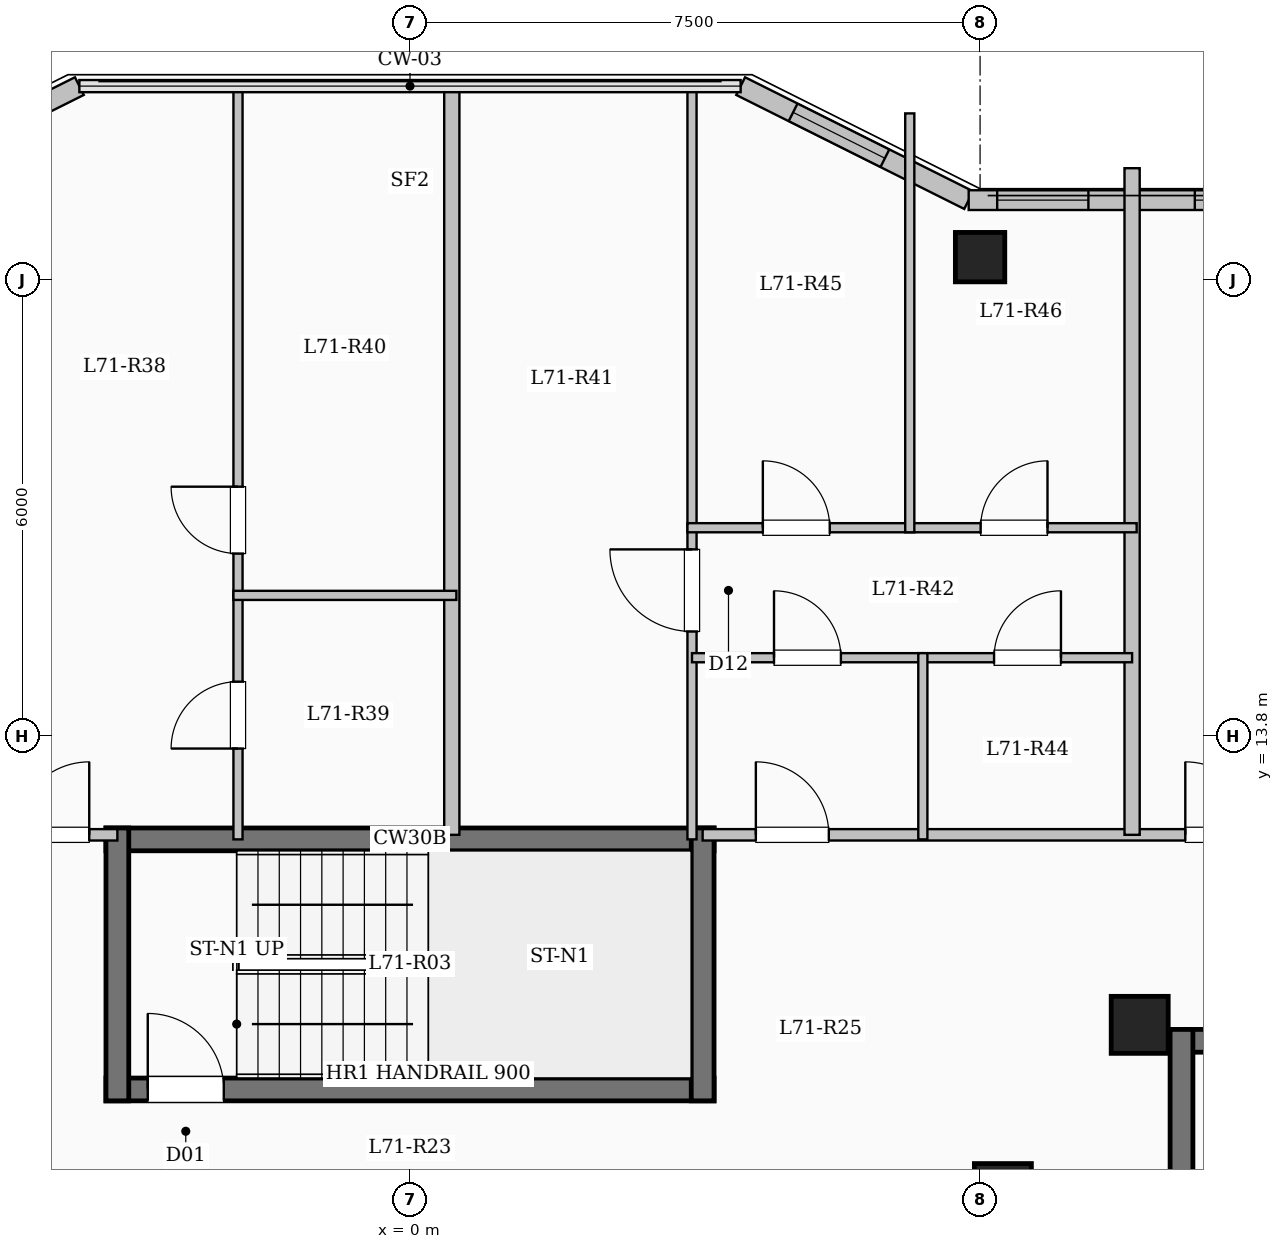
"""IFC4 building model, lengths in metres.
Left out: names, types, materials, properties, quantities, classifications, styles, units other than length and angle.
Written with IfcOpenShell. Run it as: python <this file> out.ifc"""

import sys

from ifc_helpers import new_model, si_unit, direction, frame, frame_2d, origin, origin_2d, place, context, subcontext, project, spatial, rectangle, extrude, element, fill, save


model = new_model("IFC4")
c1 = context("Model", 3, precision=1e-05, world=origin(), true_north=direction((0.0, 1.0)))
c2 = subcontext(c1, "Body", "Model", "MODEL_VIEW")
j1 = project(units=[si_unit("LENGTHUNIT", "METRE"), si_unit("PLANEANGLEUNIT", "RADIAN")], contexts=[c1])
p1 = place(None, origin())
s1 = spatial("IfcSite", under=j1, at=p1, CompositionType="ELEMENT")
p2 = place(p1, origin())
s2 = spatial("IfcBuilding", under=s1, at=p2, CompositionType="ELEMENT")
p3 = place(p2, frame((0.0, 0.0, 261.6)))
s3 = spatial("IfcBuildingStorey", under=s2, at=p3, CompositionType="ELEMENT", Elevation=261.6)
for number, where, z_axis, x_axis in (
    (1, (7.8, 7.8, 0.0), (0.0, 0.0, 1.0), (1.0, 0.0, 0.0)),
    (2, (9.6, 10.0, 0.0), (0.0, 0.0, 1.0), (1.0, 0.0, 0.0)),
):
    element("IfcColumn", number, at=place(p3, frame(where, z_axis=z_axis, x_axis=x_axis)), inside=s3, PredefinedType="COLUMN", context=c2, shape_type="SweptSolid", body=[
        extrude(rectangle(XDim=0.75, YDim=0.75, at=origin_2d()), origin(), (0.0, 0.0, 1.0), 3.35),
    ])
p4 = place(p3, frame((7.5, 20.1, 0.0), z_axis=(0.0, 0.0, 1.0), x_axis=(1.0, 0.0, 0.0)))
e3 = element("IfcColumn", 3, at=p4, inside=s3, PredefinedType="COLUMN", context=c2, shape_type="SweptSolid", body=[
    extrude(rectangle(XDim=0.65, YDim=0.65, at=origin_2d()), origin(), (0.0, 0.0, 1.0), 3.35),
])
p5 = place(p3, frame((-7.35, 20.85, 0.0), z_axis=(0.0, 0.0, 1.0), x_axis=(0.894427191, 0.4472135955, 0.0)))
e4 = element("IfcWall", 4, at=p5, inside=s3, PredefinedType="SOLIDWALL", context=c2, shape_type="SweptSolid", body=[
    extrude(rectangle(XDim=3.354, YDim=0.26, at=frame_2d((1.677, 0.0))), origin(), (0.0, 0.0, 1.0), 3.1),
])
p6 = place(p5, frame((0.401, 0.0, 0.95)))
e5 = element("IfcOpeningElement", 5, at=p6, cuts=e4, PredefinedType="OPENING", context=c2, shape_type="SweptSolid", body=[
    extrude(rectangle(XDim=1.0, YDim=1.5, at=frame_2d((0.5, 0.75))), frame((0.0, 0.14, 0.0), z_axis=(0.0, -1.0, 0.0), x_axis=(1.0, 0.0, 0.0)), (0.0, 0.0, 1.0), 0.28),
])
p7 = place(p3, frame((4.35, 22.35, 0.0), z_axis=(0.0, 0.0, 1.0), x_axis=(0.894427191, -0.4472135955, 0.0)))
e6 = element("IfcWall", 6, at=p7, inside=s3, PredefinedType="SOLIDWALL", context=c2, shape_type="SweptSolid", body=[
    extrude(rectangle(XDim=3.354, YDim=0.26, at=frame_2d((1.677, 0.0))), origin(), (0.0, 0.0, 1.0), 3.1),
])
p8 = place(p7, frame((0.772, 0.0, 0.95)))
e7 = element("IfcOpeningElement", 7, at=p8, cuts=e6, PredefinedType="OPENING", context=c2, shape_type="SweptSolid", body=[
    extrude(rectangle(XDim=1.35, YDim=1.55, at=frame_2d((0.675, 0.775))), frame((0.0, 0.14, 0.0), z_axis=(0.0, -1.0, 0.0), x_axis=(1.0, 0.0, 0.0)), (0.0, 0.0, 1.0), 0.28),
])
p9 = place(p3, frame((7.35, 20.85, 0.0), z_axis=(0.0, 0.0, 1.0), x_axis=(1.0, 0.0, 0.0)))
e8 = element("IfcWall", 8, at=p9, inside=s3, PredefinedType="SOLIDWALL", context=c2, shape_type="SweptSolid", body=[
    extrude(rectangle(XDim=10.5, YDim=0.26, at=frame_2d((5.25, 0.0))), origin(), (0.0, 0.0, 1.0), 3.1),
])
p10 = place(p9, frame((0.375, 0.0, 0.95)))
e9 = element("IfcOpeningElement", 9, at=p10, cuts=e8, PredefinedType="OPENING", context=c2, shape_type="SweptSolid", body=[
    extrude(rectangle(XDim=1.2, YDim=1.5, at=frame_2d((0.6, 0.75))), frame((0.0, 0.14, 0.0), z_axis=(0.0, -1.0, 0.0), x_axis=(1.0, 0.0, 0.0)), (0.0, 0.0, 1.0), 0.28),
])
p11 = place(p9, frame((2.975, 0.0, 0.9)))
e10 = element("IfcOpeningElement", 10, at=p11, cuts=e8, PredefinedType="OPENING", context=c2, shape_type="SweptSolid", body=[
    extrude(rectangle(XDim=1.65, YDim=1.6, at=frame_2d((0.825, 0.8))), frame((0.0, 0.14, 0.0), z_axis=(0.0, -1.0, 0.0), x_axis=(1.0, 0.0, 0.0)), (0.0, 0.0, 1.0), 0.28),
])
p12 = place(p9, frame((6.1, 0.0, 0.95)))
e11 = element("IfcOpeningElement", 11, at=p12, cuts=e8, PredefinedType="OPENING", context=c2, shape_type="SweptSolid", body=[
    extrude(rectangle(XDim=1.2, YDim=1.5, at=frame_2d((0.6, 0.75))), frame((0.0, 0.14, 0.0), z_axis=(0.0, -1.0, 0.0), x_axis=(1.0, 0.0, 0.0)), (0.0, 0.0, 1.0), 0.28),
])
p13 = place(p9, frame((8.575, 0.0, 0.95)))
e12 = element("IfcOpeningElement", 12, at=p13, cuts=e8, PredefinedType="OPENING", context=c2, shape_type="SweptSolid", body=[
    extrude(rectangle(XDim=1.2, YDim=1.5, at=frame_2d((0.6, 0.75))), frame((0.0, 0.14, 0.0), z_axis=(0.0, -1.0, 0.0), x_axis=(1.0, 0.0, 0.0)), (0.0, 0.0, 1.0), 0.28),
])
p14 = place(p3, frame((10.0, 9.79, 0.0), z_axis=(0.0, 0.0, 1.0), x_axis=(1.0, 0.0, 0.0)))
e13 = element("IfcWall", 13, at=p14, inside=s3, PredefinedType="SHEAR", context=c2, shape_type="SweptSolid", body=[
    extrude(rectangle(XDim=8.0, YDim=0.3, at=frame_2d((4.0, 0.0))), origin(), (0.0, 0.0, 1.0), 3.35),
])
p15 = place(p3, frame((10.15, 6.35, 0.0), z_axis=(0.0, 0.0, 1.0), x_axis=(0.0, 1.0, 0.0)))
e14 = element("IfcWall", 14, at=p15, inside=s3, PredefinedType="SHEAR", context=c2, shape_type="SweptSolid", body=[
    extrude(rectangle(XDim=3.59, YDim=0.3, at=frame_2d((1.795, 0.0))), origin(), (0.0, 0.0, 1.0), 3.35),
])
p16 = place(p3, frame((-4.0, 12.44, 0.0), z_axis=(0.0, 0.0, 1.0), x_axis=(1.0, 0.0, 0.0)))
e15 = element("IfcWall", 15, at=p16, inside=s3, PredefinedType="SHEAR", context=c2, shape_type="SweptSolid", body=[
    extrude(rectangle(XDim=8.0, YDim=0.3, at=frame_2d((4.0, 0.0))), origin(), (0.0, 0.0, 1.0), 3.35),
])
p17 = place(p3, frame((-4.0, 9.15, 0.0), z_axis=(0.0, 0.0, 1.0), x_axis=(1.0, 0.0, 0.0)))
e16 = element("IfcWall", 16, at=p17, inside=s3, PredefinedType="SHEAR", context=c2, shape_type="SweptSolid", body=[
    extrude(rectangle(XDim=8.0, YDim=0.3, at=frame_2d((4.0, 0.0))), origin(), (0.0, 0.0, 1.0), 3.35),
])
p18 = place(p17, frame((0.55, 0.0, 0.0)))
e17 = element("IfcOpeningElement", 17, at=p18, cuts=e16, PredefinedType="OPENING", context=c2, shape_type="SweptSolid", body=[
    extrude(rectangle(XDim=1.0, YDim=2.15, at=frame_2d((0.5, 1.075))), frame((0.0, 0.16, 0.0), z_axis=(0.0, -1.0, 0.0), x_axis=(1.0, 0.0, 0.0)), (0.0, 0.0, 1.0), 0.32),
])
for number, where, z_axis, x_axis in (
    (18, (-3.85, 9.0, 0.0), (0.0, 0.0, 1.0), (0.0, 1.0, 0.0)),
    (19, (3.85, 9.0, 0.0), (0.0, 0.0, 1.0), (0.0, 1.0, 0.0)),
):
    element("IfcWall", number, at=place(p3, frame(where, z_axis=z_axis, x_axis=x_axis)), inside=s3, PredefinedType="SHEAR", context=c2, shape_type="SweptSolid", body=[
        extrude(rectangle(XDim=3.59, YDim=0.3, at=frame_2d((1.795, 0.0))), origin(), (0.0, 0.0, 1.0), 3.35),
    ])
p19 = place(p3, frame((-17.75, 12.5, 0.0), z_axis=(0.0, 0.0, 1.0), x_axis=(1.0, 0.0, 0.0)))
e20 = element("IfcWall", 20, at=p19, inside=s3, PredefinedType="PARTITIONING", context=c2, shape_type="SweptSolid", body=[
    extrude(rectangle(XDim=13.9, YDim=0.15, at=frame_2d((6.95, 0.0))), origin(), (0.0, 0.0, 1.0), 3.1),
])
p20 = place(p19, frame((0.7, 0.0, 0.0)))
e21 = element("IfcOpeningElement", 21, at=p20, cuts=e20, PredefinedType="OPENING", context=c2, shape_type="SweptSolid", body=[
    extrude(rectangle(XDim=0.96, YDim=2.15, at=frame_2d((0.48, 1.075))), frame((0.0, 0.085, 0.0), z_axis=(0.0, -1.0, 0.0), x_axis=(1.0, 0.0, 0.0)), (0.0, 0.0, 1.0), 0.17),
])
p21 = place(p19, frame((7.105, 0.0, 0.0)))
e22 = element("IfcOpeningElement", 22, at=p21, cuts=e20, PredefinedType="OPENING", context=c2, shape_type="SweptSolid", body=[
    extrude(rectangle(XDim=0.96, YDim=2.15, at=frame_2d((0.48, 1.075))), frame((0.0, 0.085, 0.0), z_axis=(0.0, -1.0, 0.0), x_axis=(1.0, 0.0, 0.0)), (0.0, 0.0, 1.0), 0.17),
])
p22 = place(p19, frame((12.57, 0.0, 0.0)))
e23 = element("IfcOpeningElement", 23, at=p22, cuts=e20, PredefinedType="OPENING", context=c2, shape_type="SweptSolid", body=[
    extrude(rectangle(XDim=0.96, YDim=2.15, at=frame_2d((0.48, 1.075))), frame((0.0, 0.085, 0.0), z_axis=(0.0, -1.0, 0.0), x_axis=(1.0, 0.0, 0.0)), (0.0, 0.0, 1.0), 0.17),
])
p23 = place(p3, frame((3.85, 12.5, 0.0), z_axis=(0.0, 0.0, 1.0), x_axis=(1.0, 0.0, 0.0)))
e24 = element("IfcWall", 24, at=p23, inside=s3, PredefinedType="PARTITIONING", context=c2, shape_type="SweptSolid", body=[
    extrude(rectangle(XDim=13.9, YDim=0.15, at=frame_2d((6.95, 0.0))), origin(), (0.0, 0.0, 1.0), 3.1),
])
p24 = place(p23, frame((0.7, 0.0, 0.0)))
e25 = element("IfcOpeningElement", 25, at=p24, cuts=e24, PredefinedType="OPENING", context=c2, shape_type="SweptSolid", body=[
    extrude(rectangle(XDim=0.96, YDim=2.15, at=frame_2d((0.48, 1.075))), frame((0.0, 0.085, 0.0), z_axis=(0.0, -1.0, 0.0), x_axis=(1.0, 0.0, 0.0)), (0.0, 0.0, 1.0), 0.17),
])
p25 = place(p23, frame((6.35, 0.0, 0.0)))
e26 = element("IfcOpeningElement", 26, at=p25, cuts=e24, PredefinedType="OPENING", context=c2, shape_type="SweptSolid", body=[
    extrude(rectangle(XDim=0.96, YDim=2.15, at=frame_2d((0.48, 1.075))), frame((0.0, 0.085, 0.0), z_axis=(0.0, -1.0, 0.0), x_axis=(1.0, 0.0, 0.0)), (0.0, 0.0, 1.0), 0.17),
])
p26 = place(p3, frame((0.55, 12.5, 0.0), z_axis=(0.0, 0.0, 1.0), x_axis=(0.0, 1.0, 0.0)))
e27 = element("IfcWall", 27, at=p26, inside=s3, PredefinedType="SOLIDWALL", context=c2, shape_type="SweptSolid", body=[
    extrude(rectangle(XDim=9.88, YDim=0.2, at=frame_2d((4.94, 0.0))), origin(), (0.0, 0.0, 1.0), 3.1),
])
p27 = place(p3, frame((-2.263, 12.44, 0.0), z_axis=(0.0, 0.0, 1.0), x_axis=(0.0, 1.0, 0.0)))
e28 = element("IfcWall", 28, at=p27, inside=s3, PredefinedType="PARTITIONING", context=c2, shape_type="SweptSolid", body=[
    extrude(rectangle(XDim=3.21, YDim=0.12, at=frame_2d((1.605, 0.0))), origin(), (0.0, 0.0, 1.0), 3.1),
])
p28 = place(p27, frame((1.195, 0.0, 0.0)))
e29 = element("IfcOpeningElement", 29, at=p28, cuts=e28, PredefinedType="OPENING", context=c2, shape_type="SweptSolid", body=[
    extrude(rectangle(XDim=0.88, YDim=2.1, at=frame_2d((0.44, 1.05))), frame((0.0, 0.07, 0.0), z_axis=(0.0, -1.0, 0.0), x_axis=(1.0, 0.0, 0.0)), (0.0, 0.0, 1.0), 0.14),
])
p29 = place(p3, frame((-2.263, 15.65, 0.0), z_axis=(0.0, 0.0, 1.0), x_axis=(0.0, 1.0, 0.0)))
e30 = element("IfcWall", 30, at=p29, inside=s3, PredefinedType="PARTITIONING", context=c2, shape_type="SweptSolid", body=[
    extrude(rectangle(XDim=6.73, YDim=0.12, at=frame_2d((3.365, 0.0))), origin(), (0.0, 0.0, 1.0), 3.1),
])
p30 = place(p29, frame((0.55, 0.0, 0.0)))
e31 = element("IfcOpeningElement", 31, at=p30, cuts=e30, PredefinedType="OPENING", context=c2, shape_type="SweptSolid", body=[
    extrude(rectangle(XDim=0.88, YDim=2.1, at=frame_2d((0.44, 1.05))), frame((0.0, 0.07, 0.0), z_axis=(0.0, -1.0, 0.0), x_axis=(1.0, 0.0, 0.0)), (0.0, 0.0, 1.0), 0.14),
])
p31 = place(p3, frame((-2.323, 15.65, 0.0), z_axis=(0.0, 0.0, 1.0), x_axis=(1.0, 0.0, 0.0)))
e32 = element("IfcWall", 32, at=p31, inside=s3, PredefinedType="PARTITIONING", context=c2, shape_type="SweptSolid", body=[
    extrude(rectangle(XDim=2.933, YDim=0.12, at=frame_2d((1.467, 0.0))), origin(), (0.0, 0.0, 1.0), 2.785),
])
p32 = place(p3, frame((9.5, 12.5, 0.0), z_axis=(0.0, 0.0, 1.0), x_axis=(0.0, 1.0, 0.0)))
e33 = element("IfcWall", 33, at=p32, inside=s3, PredefinedType="SOLIDWALL", context=c2, shape_type="SweptSolid", body=[
    extrude(rectangle(XDim=8.77, YDim=0.2, at=frame_2d((4.385, 0.0))), origin(), (0.0, 0.0, 1.0), 3.1),
])
p33 = place(p3, frame((3.71, 12.44, 0.0), z_axis=(0.0, 0.0, 1.0), x_axis=(0.0, 1.0, 0.0)))
e34 = element("IfcWall", 34, at=p33, inside=s3, PredefinedType="PARTITIONING", context=c2, shape_type="SweptSolid", body=[
    extrude(rectangle(XDim=9.94, YDim=0.12, at=frame_2d((4.97, 0.0))), origin(), (0.0, 0.0, 1.0), 3.1),
])
p34 = place(p33, frame((2.735, 0.0, 0.0)))
e35 = element("IfcOpeningElement", 35, at=p34, cuts=e34, PredefinedType="OPENING", context=c2, shape_type="SweptSolid", body=[
    extrude(rectangle(XDim=1.08, YDim=2.15, at=frame_2d((0.54, 1.075))), frame((0.0, 0.07, 0.0), z_axis=(0.0, -1.0, 0.0), x_axis=(1.0, 0.0, 0.0)), (0.0, 0.0, 1.0), 0.14),
])
p35 = place(p3, frame((3.71, 14.83, 0.0), z_axis=(0.0, 0.0, 1.0), x_axis=(1.0, 0.0, 0.0)))
e36 = element("IfcWall", 36, at=p35, inside=s3, PredefinedType="PARTITIONING", context=c2, shape_type="SweptSolid", body=[
    extrude(rectangle(XDim=3.037, YDim=0.12, at=frame_2d((1.519, 0.0))), origin(), (0.0, 0.0, 1.0), 3.1),
])
p36 = place(p35, frame((1.079, 0.0, 0.0)))
e37 = element("IfcOpeningElement", 37, at=p36, cuts=e36, PredefinedType="OPENING", context=c2, shape_type="SweptSolid", body=[
    extrude(rectangle(XDim=0.88, YDim=2.1, at=frame_2d((0.44, 1.05))), frame((0.0, 0.07, 0.0), z_axis=(0.0, -1.0, 0.0), x_axis=(1.0, 0.0, 0.0)), (0.0, 0.0, 1.0), 0.14),
])
p37 = place(p3, frame((6.747, 14.83, 0.0), z_axis=(0.0, 0.0, 1.0), x_axis=(1.0, 0.0, 0.0)))
e38 = element("IfcWall", 38, at=p37, inside=s3, PredefinedType="PARTITIONING", context=c2, shape_type="SweptSolid", body=[
    extrude(rectangle(XDim=2.753, YDim=0.12, at=frame_2d((1.376, 0.0))), origin(), (0.0, 0.0, 1.0), 3.1),
])
p38 = place(p37, frame((0.937, 0.0, 0.0)))
e39 = element("IfcOpeningElement", 39, at=p38, cuts=e38, PredefinedType="OPENING", context=c2, shape_type="SweptSolid", body=[
    extrude(rectangle(XDim=0.88, YDim=2.1, at=frame_2d((0.44, 1.05))), frame((0.0, 0.07, 0.0), z_axis=(0.0, -1.0, 0.0), x_axis=(1.0, 0.0, 0.0)), (0.0, 0.0, 1.0), 0.14),
])
p39 = place(p3, frame((3.65, 16.54, 0.0), z_axis=(0.0, 0.0, 1.0), x_axis=(1.0, 0.0, 0.0)))
e40 = element("IfcWall", 40, at=p39, inside=s3, PredefinedType="PARTITIONING", context=c2, shape_type="SweptSolid", body=[
    extrude(rectangle(XDim=5.91, YDim=0.12, at=frame_2d((2.955, 0.0))), origin(), (0.0, 0.0, 1.0), 3.1),
])
p40 = place(p39, frame((0.992, 0.0, 0.0)))
e41 = element("IfcOpeningElement", 41, at=p40, cuts=e40, PredefinedType="OPENING", context=c2, shape_type="SweptSolid", body=[
    extrude(rectangle(XDim=0.88, YDim=2.1, at=frame_2d((0.44, 1.05))), frame((0.0, 0.07, 0.0), z_axis=(0.0, -1.0, 0.0), x_axis=(1.0, 0.0, 0.0)), (0.0, 0.0, 1.0), 0.14),
])
p41 = place(p39, frame((3.857, 0.0, 0.0)))
e42 = element("IfcOpeningElement", 42, at=p41, cuts=e40, PredefinedType="OPENING", context=c2, shape_type="SweptSolid", body=[
    extrude(rectangle(XDim=0.88, YDim=2.1, at=frame_2d((0.44, 1.05))), frame((0.0, 0.07, 0.0), z_axis=(0.0, -1.0, 0.0), x_axis=(1.0, 0.0, 0.0)), (0.0, 0.0, 1.0), 0.14),
])
p42 = place(p3, frame((6.747, 12.44, 0.0), z_axis=(0.0, 0.0, 1.0), x_axis=(0.0, 1.0, 0.0)))
e43 = element("IfcWall", 43, at=p42, inside=s3, PredefinedType="PARTITIONING", context=c2, shape_type="SweptSolid", body=[
    extrude(rectangle(XDim=2.45, YDim=0.12, at=frame_2d((1.225, 0.0))), origin(), (0.0, 0.0, 1.0), 3.1),
])
p43 = place(p3, frame((6.575, 16.48, 0.0), z_axis=(0.0, 0.0, 1.0), x_axis=(0.0, 1.0, 0.0)))
e44 = element("IfcWall", 44, at=p43, inside=s3, PredefinedType="PARTITIONING", context=c2, shape_type="SweptSolid", body=[
    extrude(rectangle(XDim=5.511, YDim=0.12, at=frame_2d((2.755, 0.0))), origin(), (0.0, 0.0, 1.0), 3.1),
])
p44 = place(p8, origin())
e45 = element("IfcWindow", 45, at=p44, inside=s3, PartitioningType="SINGLE_PANEL", PredefinedType="WINDOW", context=c2, shape_type="SweptSolid", body=[
    extrude(rectangle(XDim=1.35, YDim=1.55, at=frame_2d((0.675, 0.775))), frame((0.0, 0.03, 0.0), z_axis=(0.0, -1.0, 0.0), x_axis=(1.0, 0.0, 0.0)), (0.0, 0.0, 1.0), 0.06),
])
fill(e7, e45)
p45 = place(p10, origin())
e46 = element("IfcWindow", 46, at=p45, inside=s3, PartitioningType="SINGLE_PANEL", PredefinedType="WINDOW", context=c2, shape_type="SweptSolid", body=[
    extrude(rectangle(XDim=1.2, YDim=1.5, at=frame_2d((0.6, 0.75))), frame((0.0, 0.03, 0.0), z_axis=(0.0, -1.0, 0.0), x_axis=(1.0, 0.0, 0.0)), (0.0, 0.0, 1.0), 0.06),
])
fill(e9, e46)
p46 = place(p11, origin())
e47 = element("IfcWindow", 47, at=p46, inside=s3, PartitioningType="SINGLE_PANEL", PredefinedType="WINDOW", context=c2, shape_type="SweptSolid", body=[
    extrude(rectangle(XDim=1.65, YDim=1.6, at=frame_2d((0.825, 0.8))), frame((0.0, 0.03, 0.0), z_axis=(0.0, -1.0, 0.0), x_axis=(1.0, 0.0, 0.0)), (0.0, 0.0, 1.0), 0.06),
])
fill(e10, e47)
p47 = place(p18, origin())
e48 = element("IfcDoor", 48, at=p47, inside=s3, OperationType="SINGLE_SWING_LEFT", PredefinedType="DOOR", context=c2, shape_type="SweptSolid", body=[
    extrude(rectangle(XDim=1.0, YDim=2.15, at=frame_2d((0.5, 1.075))), frame((0.0, 0.025, 0.0), z_axis=(0.0, -1.0, 0.0), x_axis=(1.0, 0.0, 0.0)), (0.0, 0.0, 1.0), 0.05),
])
fill(e17, e48)
p48 = place(p22, origin())
e49 = element("IfcDoor", 49, at=p48, inside=s3, OperationType="SINGLE_SWING_RIGHT", PredefinedType="DOOR", context=c2, shape_type="SweptSolid", body=[
    extrude(rectangle(XDim=0.96, YDim=2.15, at=frame_2d((0.48, 1.075))), frame((0.0, 0.025, 0.0), z_axis=(0.0, -1.0, 0.0), x_axis=(1.0, 0.0, 0.0)), (0.0, 0.0, 1.0), 0.05),
])
fill(e23, e49)
p49 = place(p28, origin())
e50 = element("IfcDoor", 50, at=p49, inside=s3, OperationType="SINGLE_SWING_LEFT", PredefinedType="DOOR", context=c2, shape_type="SweptSolid", body=[
    extrude(rectangle(XDim=0.88, YDim=2.1, at=frame_2d((0.44, 1.05))), frame((0.0, 0.025, 0.0), z_axis=(0.0, -1.0, 0.0), x_axis=(1.0, 0.0, 0.0)), (0.0, 0.0, 1.0), 0.05),
])
fill(e29, e50)
p50 = place(p30, origin())
e51 = element("IfcDoor", 51, at=p50, inside=s3, OperationType="SINGLE_SWING_RIGHT", PredefinedType="DOOR", context=c2, shape_type="SweptSolid", body=[
    extrude(rectangle(XDim=0.88, YDim=2.1, at=frame_2d((0.44, 1.05))), frame((0.0, 0.025, 0.0), z_axis=(0.0, -1.0, 0.0), x_axis=(1.0, 0.0, 0.0)), (0.0, 0.0, 1.0), 0.05),
])
fill(e31, e51)
p51 = place(p24, origin())
e52 = element("IfcDoor", 52, at=p51, inside=s3, OperationType="SINGLE_SWING_LEFT", PredefinedType="DOOR", context=c2, shape_type="SweptSolid", body=[
    extrude(rectangle(XDim=0.96, YDim=2.15, at=frame_2d((0.48, 1.075))), frame((0.0, 0.025, 0.0), z_axis=(0.0, -1.0, 0.0), x_axis=(1.0, 0.0, 0.0)), (0.0, 0.0, 1.0), 0.05),
])
fill(e25, e52)
p52 = place(p34, origin())
e53 = element("IfcDoor", 53, at=p52, inside=s3, OperationType="SINGLE_SWING_RIGHT", PredefinedType="DOOR", context=c2, shape_type="SweptSolid", body=[
    extrude(rectangle(XDim=1.08, YDim=2.15, at=frame_2d((0.54, 1.075))), frame((0.0, 0.025, 0.0), z_axis=(0.0, -1.0, 0.0), x_axis=(1.0, 0.0, 0.0)), (0.0, 0.0, 1.0), 0.05),
])
fill(e35, e53)
p53 = place(p36, origin())
e54 = element("IfcDoor", 54, at=p53, inside=s3, OperationType="SINGLE_SWING_LEFT", PredefinedType="DOOR", context=c2, shape_type="SweptSolid", body=[
    extrude(rectangle(XDim=0.88, YDim=2.1, at=frame_2d((0.44, 1.05))), frame((0.0, 0.025, 0.0), z_axis=(0.0, -1.0, 0.0), x_axis=(1.0, 0.0, 0.0)), (0.0, 0.0, 1.0), 0.05),
])
fill(e37, e54)
p54 = place(p38, origin())
e55 = element("IfcDoor", 55, at=p54, inside=s3, OperationType="SINGLE_SWING_RIGHT", PredefinedType="DOOR", context=c2, shape_type="SweptSolid", body=[
    extrude(rectangle(XDim=0.88, YDim=2.1, at=frame_2d((0.44, 1.05))), frame((0.0, 0.025, 0.0), z_axis=(0.0, -1.0, 0.0), x_axis=(1.0, 0.0, 0.0)), (0.0, 0.0, 1.0), 0.05),
])
fill(e39, e55)
p55 = place(p40, origin())
e56 = element("IfcDoor", 56, at=p55, inside=s3, OperationType="SINGLE_SWING_LEFT", PredefinedType="DOOR", context=c2, shape_type="SweptSolid", body=[
    extrude(rectangle(XDim=0.88, YDim=2.1, at=frame_2d((0.44, 1.05))), frame((0.0, 0.025, 0.0), z_axis=(0.0, -1.0, 0.0), x_axis=(1.0, 0.0, 0.0)), (0.0, 0.0, 1.0), 0.05),
])
fill(e41, e56)
p56 = place(p41, origin())
e57 = element("IfcDoor", 57, at=p56, inside=s3, OperationType="SINGLE_SWING_RIGHT", PredefinedType="DOOR", context=c2, shape_type="SweptSolid", body=[
    extrude(rectangle(XDim=0.88, YDim=2.1, at=frame_2d((0.44, 1.05))), frame((0.0, 0.025, 0.0), z_axis=(0.0, -1.0, 0.0), x_axis=(1.0, 0.0, 0.0)), (0.0, 0.0, 1.0), 0.05),
])
fill(e42, e57)
p57 = place(p25, origin())
e58 = element("IfcDoor", 58, at=p57, inside=s3, OperationType="SINGLE_SWING_LEFT", PredefinedType="DOOR", context=c2, shape_type="SweptSolid", body=[
    extrude(rectangle(XDim=0.96, YDim=2.15, at=frame_2d((0.48, 1.075))), frame((0.0, 0.025, 0.0), z_axis=(0.0, -1.0, 0.0), x_axis=(1.0, 0.0, 0.0)), (0.0, 0.0, 1.0), 0.05),
])
fill(e26, e58)
save(model, sys.argv[1])
